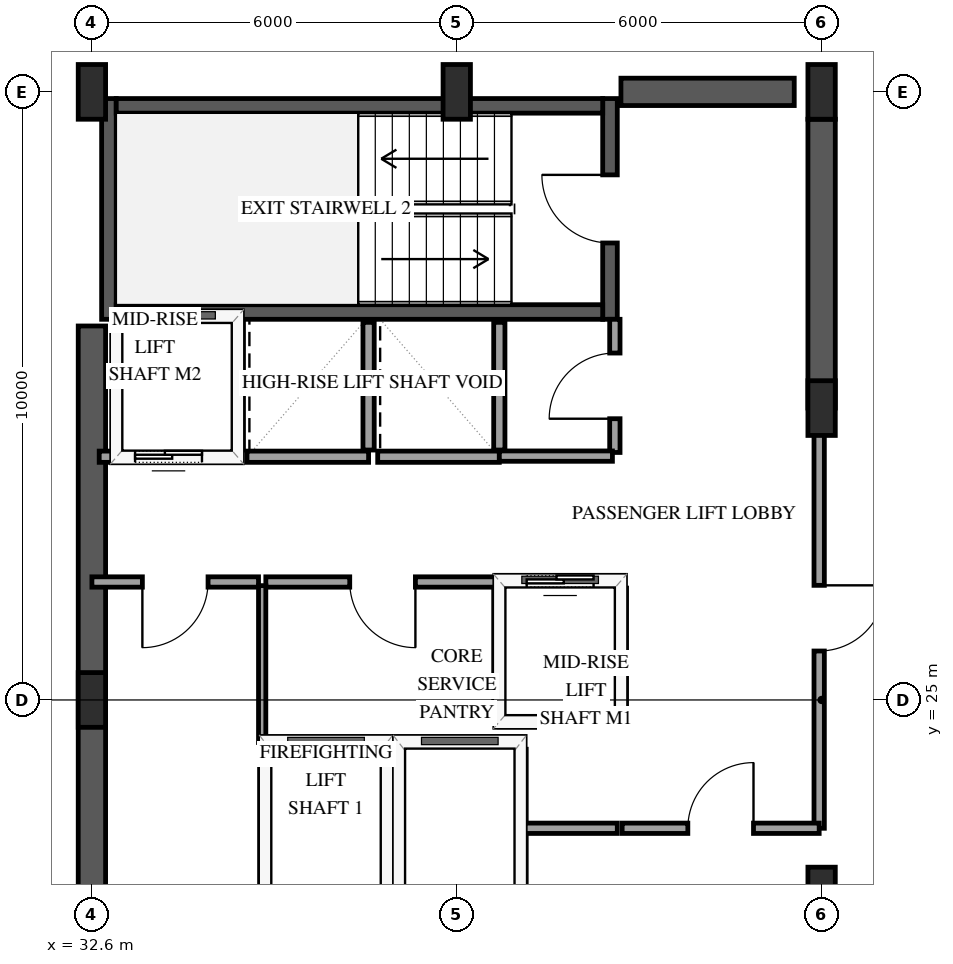
"""IFC4 building model, lengths in metres.
Left out: names, types, materials, properties, quantities, classifications, styles, units other than length and angle.
Written with IfcOpenShell. Run it as: python <this file> out.ifc"""

import sys

from ifc_helpers import new_model, si_unit, direction, frame, frame_2d, origin, origin_2d, place, context, subcontext, project, spatial, rectangle, extrude, element, fill, save


model = new_model("IFC4")
c1 = context("Model", 3, precision=1e-05, world=origin(), true_north=direction((0.0, 1.0)))
c2 = subcontext(c1, "Body", "Model", "MODEL_VIEW")
j1 = project(units=[si_unit("LENGTHUNIT", "METRE"), si_unit("PLANEANGLEUNIT", "RADIAN")], contexts=[c1])
p1 = place(None, origin())
s1 = spatial("IfcSite", under=j1, at=p1, CompositionType="ELEMENT")
p2 = place(p1, origin())
s2 = spatial("IfcBuilding", under=s1, at=p2, CompositionType="ELEMENT")
p3 = place(p2, frame((0.0, 0.0, 226.6)))
s3 = spatial("IfcBuildingStorey", under=s2, at=p3, CompositionType="ELEMENT", Elevation=226.6)
p4 = place(p3, frame((32.88, 31.26, 0.0), z_axis=(0.0, 0.0, 1.0), x_axis=(0.0, 1.0, 0.0)))
e1 = element("IfcWall", 1, at=p4, inside=s3, PredefinedType="SHEAR", context=c2, shape_type="SweptSolid", body=[
    extrude(rectangle(XDim=3.63, YDim=0.24, at=frame_2d((1.815, 0.0))), origin(), (0.0, 0.0, 1.0), 3.6),
])
p5 = place(p3, frame((41.12, 31.26, 0.0), z_axis=(0.0, 0.0, 1.0), x_axis=(0.0, 1.0, 0.0)))
e2 = element("IfcWall", 2, at=p5, inside=s3, PredefinedType="SHEAR", context=c2, shape_type="SweptSolid", body=[
    extrude(rectangle(XDim=3.63, YDim=0.24, at=frame_2d((1.815, 0.0))), origin(), (0.0, 0.0, 1.0), 3.6),
])
p6 = place(p5, frame((1.255, 0.0, 0.0)))
e3 = element("IfcOpeningElement", 3, at=p6, cuts=e2, PredefinedType="OPENING", context=c2, shape_type="SweptSolid", body=[
    extrude(rectangle(XDim=1.12, YDim=2.15, at=frame_2d((0.56, 1.075))), frame((0.0, 0.13, 0.0), z_axis=(0.0, -1.0, 0.0), x_axis=(1.0, 0.0, 0.0)), (0.0, 0.0, 1.0), 0.26),
])
for number, where, z_axis, x_axis in (
    (4, (33.0, 31.38, 0.0), (0.0, 0.0, 1.0), (1.0, 0.0, 0.0)),
    (5, (33.0, 34.77, 0.0), (0.0, 0.0, 1.0), (1.0, 0.0, 0.0)),
):
    element("IfcWall", number, at=place(p3, frame(where, z_axis=z_axis, x_axis=x_axis)), inside=s3, PredefinedType="SHEAR", context=c2, shape_type="SweptSolid", body=[
        extrude(rectangle(XDim=8.0, YDim=0.24, at=frame_2d((4.0, 0.0))), origin(), (0.0, 0.0, 1.0), 3.6),
    ])
p7 = place(p3, frame((32.6, 18.85, 0.0), z_axis=(0.0, 0.0, 1.0), x_axis=(0.0, 1.0, 0.0)))
e6 = element("IfcWall", 6, at=p7, inside=s3, PredefinedType="SHEAR", context=c2, shape_type="SweptSolid", body=[
    extrude(rectangle(XDim=12.3, YDim=0.45, at=frame_2d((6.15, 0.0))), origin(), (0.0, 0.0, 1.0), 3.6),
])
p8 = place(p3, frame((41.3, 35.0, 0.0), z_axis=(0.0, 0.0, 1.0), x_axis=(1.0, 0.0, 0.0)))
e7 = element("IfcWall", 7, at=p8, inside=s3, PredefinedType="SHEAR", context=c2, shape_type="SweptSolid", body=[
    extrude(rectangle(XDim=2.85, YDim=0.45, at=frame_2d((1.425, 0.0))), origin(), (0.0, 0.0, 1.0), 3.6),
])
p9 = place(p3, frame((44.6, 29.8, 0.0), z_axis=(0.0, 0.0, 1.0), x_axis=(0.0, 1.0, 0.0)))
e8 = element("IfcWall", 8, at=p9, inside=s3, PredefinedType="SHEAR", context=c2, shape_type="SweptSolid", body=[
    extrude(rectangle(XDim=4.75, YDim=0.45, at=frame_2d((2.375, 0.0))), origin(), (0.0, 0.0, 1.0), 3.6),
])
for number, where, z_axis, x_axis in (
    (9, (32.6, 25.0, 0.0), (0.0, 0.0, 1.0), (1.0, 0.0, 0.0)),
    (10, (32.6, 35.0, 0.0), (0.0, 0.0, 1.0), (1.0, 0.0, 0.0)),
    (11, (38.6, 35.0, 0.0), (0.0, 0.0, 1.0), (1.0, 0.0, 0.0)),
    (12, (44.6, 21.8, 0.0), (0.0, 0.0, 1.0), (1.0, 0.0, 0.0)),
    (13, (44.6, 29.8, 0.0), (0.0, 0.0, 1.0), (1.0, 0.0, 0.0)),
    (14, (44.6, 35.0, 0.0), (0.0, 0.0, 1.0), (1.0, 0.0, 0.0)),
):
    element("IfcColumn", number, at=place(p3, frame(where, z_axis=z_axis, x_axis=x_axis)), inside=s3, PredefinedType="PILASTER", context=c2, shape_type="SweptSolid", body=[
        extrude(rectangle(XDim=0.45, YDim=0.9, at=origin_2d()), origin(), (0.0, 0.0, 1.0), 3.6),
    ])
p10 = place(p3, frame((35.45, 24.3, 0.0), z_axis=(0.0, 0.0, 1.0), x_axis=(1.0, 0.0, 0.0)))
e15 = element("IfcWall", 15, at=p10, inside=s3, PredefinedType="SOLIDWALL", context=c2, shape_type="SweptSolid", body=[
    extrude(rectangle(XDim=2.0, YDim=0.185, at=frame_2d((1.0, 0.0))), origin(), (0.0, 0.0, 1.0), 3.3),
])
for number, where, z_axis, x_axis in (
    (16, (35.45, 21.81, 0.0), (0.0, 0.0, 1.0), (0.0, 1.0, 0.0)),
    (17, (37.45, 21.81, 0.0), (0.0, 0.0, 1.0), (0.0, 1.0, 0.0)),
):
    element("IfcWall", number, at=place(p3, frame(where, z_axis=z_axis, x_axis=x_axis)), inside=s3, PredefinedType="SOLIDWALL", context=c2, shape_type="SweptSolid", body=[
        extrude(rectangle(XDim=2.38, YDim=0.185, at=frame_2d((1.19, 0.0))), origin(), (0.0, 0.0, 1.0), 3.3),
    ])
p11 = place(p3, frame((37.65, 24.3, 0.0), z_axis=(0.0, 0.0, 1.0), x_axis=(1.0, 0.0, 0.0)))
e18 = element("IfcWall", 18, at=p11, inside=s3, PredefinedType="SOLIDWALL", context=c2, shape_type="SweptSolid", body=[
    extrude(rectangle(XDim=2.0, YDim=0.185, at=frame_2d((1.0, 0.0))), origin(), (0.0, 0.0, 1.0), 3.3),
])
p12 = place(p3, frame((39.65, 21.81, 0.0), z_axis=(0.0, 0.0, 1.0), x_axis=(0.0, 1.0, 0.0)))
e19 = element("IfcWall", 19, at=p12, inside=s3, PredefinedType="SOLIDWALL", context=c2, shape_type="SweptSolid", body=[
    extrude(rectangle(XDim=2.38, YDim=0.185, at=frame_2d((1.19, 0.0))), origin(), (0.0, 0.0, 1.0), 3.3),
])
p13 = place(p3, frame((39.3, 24.65, 0.0), z_axis=(0.0, 0.0, 1.0), x_axis=(1.0, 0.0, 0.0)))
e20 = element("IfcWall", 20, at=p13, inside=s3, PredefinedType="SOLIDWALL", context=c2, shape_type="SweptSolid", body=[
    extrude(rectangle(XDim=2.0, YDim=0.185, at=frame_2d((1.0, 0.0))), origin(), (0.0, 0.0, 1.0), 3.3),
])
p14 = place(p3, frame((39.3, 26.95, 0.0), z_axis=(0.0, 0.0, 1.0), x_axis=(1.0, 0.0, 0.0)))
e21 = element("IfcWall", 21, at=p14, inside=s3, PredefinedType="SOLIDWALL", context=c2, shape_type="SweptSolid", body=[
    extrude(rectangle(XDim=2.0, YDim=0.185, at=frame_2d((1.0, 0.0))), origin(), (0.0, 0.0, 1.0), 3.3),
])
p15 = place(p14, frame((0.45, 0.0, 0.0)))
e22 = element("IfcOpeningElement", 22, at=p15, cuts=e21, PredefinedType="OPENING", context=c2, shape_type="SweptSolid", body=[
    extrude(rectangle(XDim=1.1, YDim=2.15, at=frame_2d((0.55, 1.075))), frame((0.0, 0.103, 0.0), z_axis=(0.0, -1.0, 0.0), x_axis=(1.0, 0.0, 0.0)), (0.0, 0.0, 1.0), 0.205),
])
for number, where, z_axis, x_axis in (
    (23, (39.3, 24.76, 0.0), (0.0, 0.0, 1.0), (0.0, 1.0, 0.0)),
    (24, (41.3, 24.76, 0.0), (0.0, 0.0, 1.0), (0.0, 1.0, 0.0)),
):
    element("IfcWall", number, at=place(p3, frame(where, z_axis=z_axis, x_axis=x_axis)), inside=s3, PredefinedType="SOLIDWALL", context=c2, shape_type="SweptSolid", body=[
        extrude(rectangle(XDim=2.08, YDim=0.185, at=frame_2d((1.04, 0.0))), origin(), (0.0, 0.0, 1.0), 3.3),
    ])
p16 = place(p3, frame((32.72, 29.0, 0.0), z_axis=(0.0, 0.0, 1.0), x_axis=(1.0, 0.0, 0.0)))
e25 = element("IfcWall", 25, at=p16, inside=s3, PredefinedType="SOLIDWALL", context=c2, shape_type="SweptSolid", body=[
    extrude(rectangle(XDim=2.28, YDim=0.185, at=frame_2d((1.14, 0.0))), origin(), (0.0, 0.0, 1.0), 3.3),
])
p17 = place(p16, frame((0.59, 0.0, 0.0)))
e26 = element("IfcOpeningElement", 26, at=p17, cuts=e25, PredefinedType="OPENING", context=c2, shape_type="SweptSolid", body=[
    extrude(rectangle(XDim=1.1, YDim=2.15, at=frame_2d((0.55, 1.075))), frame((0.0, 0.103, 0.0), z_axis=(0.0, -1.0, 0.0), x_axis=(1.0, 0.0, 0.0)), (0.0, 0.0, 1.0), 0.205),
])
p18 = place(p3, frame((35.0, 29.11, 0.0), z_axis=(0.0, 0.0, 1.0), x_axis=(0.0, 1.0, 0.0)))
e27 = element("IfcWall", 27, at=p18, inside=s3, PredefinedType="SOLIDWALL", context=c2, shape_type="SweptSolid", body=[
    extrude(rectangle(XDim=2.1, YDim=0.185, at=frame_2d((1.05, 0.0))), origin(), (0.0, 0.0, 1.0), 3.3),
])
p19 = place(p3, frame((35.15, 29.0, 0.0), z_axis=(0.0, 0.0, 1.0), x_axis=(1.0, 0.0, 0.0)))
e28 = element("IfcWall", 28, at=p19, inside=s3, PredefinedType="SOLIDWALL", context=c2, shape_type="SweptSolid", body=[
    extrude(rectangle(XDim=2.0, YDim=0.185, at=frame_2d((1.0, 0.0))), origin(), (0.0, 0.0, 1.0), 3.3),
])
p20 = place(p3, frame((37.15, 29.11, 0.0), z_axis=(0.0, 0.0, 1.0), x_axis=(0.0, 1.0, 0.0)))
e29 = element("IfcWall", 29, at=p20, inside=s3, PredefinedType="SOLIDWALL", context=c2, shape_type="SweptSolid", body=[
    extrude(rectangle(XDim=2.1, YDim=0.185, at=frame_2d((1.05, 0.0))), origin(), (0.0, 0.0, 1.0), 3.3),
])
p21 = place(p3, frame((37.3, 29.0, 0.0), z_axis=(0.0, 0.0, 1.0), x_axis=(1.0, 0.0, 0.0)))
e30 = element("IfcWall", 30, at=p21, inside=s3, PredefinedType="SOLIDWALL", context=c2, shape_type="SweptSolid", body=[
    extrude(rectangle(XDim=2.0, YDim=0.185, at=frame_2d((1.0, 0.0))), origin(), (0.0, 0.0, 1.0), 3.3),
])
p22 = place(p3, frame((39.3, 29.11, 0.0), z_axis=(0.0, 0.0, 1.0), x_axis=(0.0, 1.0, 0.0)))
e31 = element("IfcWall", 31, at=p22, inside=s3, PredefinedType="SOLIDWALL", context=c2, shape_type="SweptSolid", body=[
    extrude(rectangle(XDim=2.1, YDim=0.185, at=frame_2d((1.05, 0.0))), origin(), (0.0, 0.0, 1.0), 3.3),
])
p23 = place(p3, frame((44.56, 29.8, 0.0), z_axis=(0.0, 0.0, 1.0), x_axis=(0.0, -1.0, 0.0)))
e32 = element("IfcWall", 32, at=p23, inside=s3, PredefinedType="PARTITIONING", context=c2, shape_type="SweptSolid", body=[
    extrude(rectangle(XDim=6.91, YDim=0.17, at=frame_2d((3.455, 0.0))), origin(), (0.0, 0.0, 1.0), 2.34),
])
p24 = place(p23, frame((2.915, 0.0, 0.0)))
e33 = element("IfcOpeningElement", 33, at=p24, cuts=e32, PredefinedType="OPENING", context=c2, shape_type="SweptSolid", body=[
    extrude(rectangle(XDim=1.08, YDim=2.15, at=frame_2d((0.54, 1.075))), frame((0.0, 0.095, 0.0), z_axis=(0.0, -1.0, 0.0), x_axis=(1.0, 0.0, 0.0)), (0.0, 0.0, 1.0), 0.19),
])
p25 = place(p3, frame((39.3, 26.94, 0.0), z_axis=(0.0, 0.0, 1.0), x_axis=(-1.0, 0.0, 0.0)))
e34 = element("IfcWall", 34, at=p25, inside=s3, PredefinedType="PARTITIONING", context=c2, shape_type="SweptSolid", body=[
    extrude(rectangle(XDim=3.84, YDim=0.17, at=frame_2d((1.92, 0.0))), origin(), (0.0, 0.0, 1.0), 3.3),
])
p26 = place(p25, frame((1.38, 0.0, 0.0)))
e35 = element("IfcOpeningElement", 35, at=p26, cuts=e34, PredefinedType="OPENING", context=c2, shape_type="SweptSolid", body=[
    extrude(rectangle(XDim=1.08, YDim=2.15, at=frame_2d((0.54, 1.075))), frame((0.0, 0.095, 0.0), z_axis=(0.0, -1.0, 0.0), x_axis=(1.0, 0.0, 0.0)), (0.0, 0.0, 1.0), 0.19),
])
p27 = place(p3, frame((41.32, 22.89, 0.0), z_axis=(0.0, 0.0, 1.0), x_axis=(1.0, 0.0, 0.0)))
e36 = element("IfcWall", 36, at=p27, inside=s3, PredefinedType="PARTITIONING", context=c2, shape_type="SweptSolid", body=[
    extrude(rectangle(XDim=3.24, YDim=0.17, at=frame_2d((1.62, 0.0))), origin(), (0.0, 0.0, 1.0), 3.3),
])
p28 = place(p27, frame((1.08, 0.0, 0.0)))
e37 = element("IfcOpeningElement", 37, at=p28, cuts=e36, PredefinedType="OPENING", context=c2, shape_type="SweptSolid", body=[
    extrude(rectangle(XDim=1.08, YDim=2.15, at=frame_2d((0.54, 1.075))), frame((0.0, 0.095, 0.0), z_axis=(0.0, -1.0, 0.0), x_axis=(1.0, 0.0, 0.0)), (0.0, 0.0, 1.0), 0.19),
])
p29 = place(p3, frame((35.34, 26.94, 0.0), z_axis=(0.0, 0.0, 1.0), x_axis=(-1.0, 0.0, 0.0)))
e38 = element("IfcWall", 38, at=p29, inside=s3, PredefinedType="PARTITIONING", context=c2, shape_type="SweptSolid", body=[
    extrude(rectangle(XDim=2.74, YDim=0.17, at=frame_2d((1.37, 0.0))), origin(), (0.0, 0.0, 1.0), 3.3),
])
p30 = place(p29, frame((0.83, 0.0, 0.0)))
e39 = element("IfcOpeningElement", 39, at=p30, cuts=e38, PredefinedType="OPENING", context=c2, shape_type="SweptSolid", body=[
    extrude(rectangle(XDim=1.08, YDim=2.15, at=frame_2d((0.54, 1.075))), frame((0.0, 0.095, 0.0), z_axis=(0.0, -1.0, 0.0), x_axis=(1.0, 0.0, 0.0)), (0.0, 0.0, 1.0), 0.19),
])
p31 = place(p3, frame((35.4, 26.88, 0.0), z_axis=(0.0, 0.0, 1.0), x_axis=(0.0, -1.0, 0.0)))
e40 = element("IfcWall", 40, at=p31, inside=s3, PredefinedType="PARTITIONING", context=c2, shape_type="SweptSolid", body=[
    extrude(rectangle(XDim=2.58, YDim=0.12, at=frame_2d((1.29, 0.0))), origin(), (0.0, 0.0, 1.0), 3.3),
])
p32 = place(p3, frame((41.2, 29.07, 0.0), z_axis=(0.0, 0.0, 1.0), x_axis=(0.0, 1.0, 0.0)))
e41 = element("IfcWall", 41, at=p32, inside=s3, PredefinedType="PARTITIONING", context=c2, shape_type="SweptSolid", body=[
    extrude(rectangle(XDim=2.19, YDim=0.17, at=frame_2d((1.095, 0.0))), origin(), (0.0, 0.0, 1.0), 3.3),
])
p33 = place(p32, frame((0.555, 0.0, 0.0)))
e42 = element("IfcOpeningElement", 42, at=p33, cuts=e41, PredefinedType="OPENING", context=c2, shape_type="SweptSolid", body=[
    extrude(rectangle(XDim=1.08, YDim=2.15, at=frame_2d((0.54, 1.075))), frame((0.0, 0.095, 0.0), z_axis=(0.0, -1.0, 0.0), x_axis=(1.0, 0.0, 0.0)), (0.0, 0.0, 1.0), 0.19),
])
p34 = place(p3, frame((39.3, 29.01, 0.0), z_axis=(0.0, 0.0, 1.0), x_axis=(1.0, 0.0, 0.0)))
e43 = element("IfcWall", 43, at=p34, inside=s3, PredefinedType="PARTITIONING", context=c2, shape_type="SweptSolid", body=[
    extrude(rectangle(XDim=1.86, YDim=0.17, at=frame_2d((0.93, 0.0))), origin(), (0.0, 0.0, 1.0), 3.3),
])
p35 = place(p3, frame((39.72, 22.89, 0.0), z_axis=(0.0, 0.0, 1.0), x_axis=(1.0, 0.0, 0.0)))
e44 = element("IfcWall", 44, at=p35, inside=s3, PredefinedType="PARTITIONING", context=c2, shape_type="SweptSolid", body=[
    extrude(rectangle(XDim=1.52, YDim=0.17, at=frame_2d((0.76, 0.0))), origin(), (0.0, 0.0, 1.0), 3.3),
])
p36 = place(p15, origin())
e45 = element("IfcDoor", 45, at=p36, inside=s3, OperationType="SLIDING_TO_LEFT", PredefinedType="DOOR", context=c2, shape_type="SweptSolid", body=[
    extrude(rectangle(XDim=1.1, YDim=2.15, at=frame_2d((0.55, 1.075))), frame((0.0, 0.025, 0.0), z_axis=(0.0, -1.0, 0.0), x_axis=(1.0, 0.0, 0.0)), (0.0, 0.0, 1.0), 0.05),
])
fill(e22, e45)
p37 = place(p17, origin())
e46 = element("IfcDoor", 46, at=p37, inside=s3, OperationType="SLIDING_TO_LEFT", PredefinedType="DOOR", context=c2, shape_type="SweptSolid", body=[
    extrude(rectangle(XDim=1.1, YDim=2.15, at=frame_2d((0.55, 1.075))), frame((0.0, 0.025, 0.0), z_axis=(0.0, -1.0, 0.0), x_axis=(1.0, 0.0, 0.0)), (0.0, 0.0, 1.0), 0.05),
])
fill(e26, e46)
p38 = place(p6, origin())
e47 = element("IfcDoor", 47, at=p38, inside=s3, OperationType="SINGLE_SWING_RIGHT", PredefinedType="DOOR", context=c2, shape_type="SweptSolid", body=[
    extrude(rectangle(XDim=1.12, YDim=2.15, at=frame_2d((0.56, 1.075))), frame((0.0, 0.025, 0.0), z_axis=(0.0, -1.0, 0.0), x_axis=(1.0, 0.0, 0.0)), (0.0, 0.0, 1.0), 0.05),
])
fill(e3, e47)
p39 = place(p24, origin())
e48 = element("IfcDoor", 48, at=p39, inside=s3, OperationType="SINGLE_SWING_LEFT", PredefinedType="DOOR", context=c2, shape_type="SweptSolid", body=[
    extrude(rectangle(XDim=1.08, YDim=2.15, at=frame_2d((0.54, 1.075))), frame((0.0, 0.025, 0.0), z_axis=(0.0, -1.0, 0.0), x_axis=(1.0, 0.0, 0.0)), (0.0, 0.0, 1.0), 0.05),
])
fill(e33, e48)
p40 = place(p26, origin())
e49 = element("IfcDoor", 49, at=p40, inside=s3, OperationType="SINGLE_SWING_LEFT", PredefinedType="DOOR", context=c2, shape_type="SweptSolid", body=[
    extrude(rectangle(XDim=1.08, YDim=2.15, at=frame_2d((0.54, 1.075))), frame((0.0, 0.025, 0.0), z_axis=(0.0, -1.0, 0.0), x_axis=(1.0, 0.0, 0.0)), (0.0, 0.0, 1.0), 0.05),
])
fill(e35, e49)
p41 = place(p28, origin())
e50 = element("IfcDoor", 50, at=p41, inside=s3, OperationType="SINGLE_SWING_RIGHT", PredefinedType="DOOR", context=c2, shape_type="SweptSolid", body=[
    extrude(rectangle(XDim=1.08, YDim=2.15, at=frame_2d((0.54, 1.075))), frame((0.0, 0.025, 0.0), z_axis=(0.0, -1.0, 0.0), x_axis=(1.0, 0.0, 0.0)), (0.0, 0.0, 1.0), 0.05),
])
fill(e37, e50)
p42 = place(p30, origin())
e51 = element("IfcDoor", 51, at=p42, inside=s3, OperationType="SINGLE_SWING_RIGHT", PredefinedType="DOOR", context=c2, shape_type="SweptSolid", body=[
    extrude(rectangle(XDim=1.08, YDim=2.15, at=frame_2d((0.54, 1.075))), frame((0.0, 0.025, 0.0), z_axis=(0.0, -1.0, 0.0), x_axis=(1.0, 0.0, 0.0)), (0.0, 0.0, 1.0), 0.05),
])
fill(e39, e51)
p43 = place(p33, origin())
e52 = element("IfcDoor", 52, at=p43, inside=s3, OperationType="SINGLE_SWING_LEFT", PredefinedType="DOOR", context=c2, shape_type="SweptSolid", body=[
    extrude(rectangle(XDim=1.08, YDim=2.15, at=frame_2d((0.54, 1.075))), frame((0.0, 0.025, 0.0), z_axis=(0.0, -1.0, 0.0), x_axis=(1.0, 0.0, 0.0)), (0.0, 0.0, 1.0), 0.05),
])
fill(e42, e52)
save(model, sys.argv[1])
